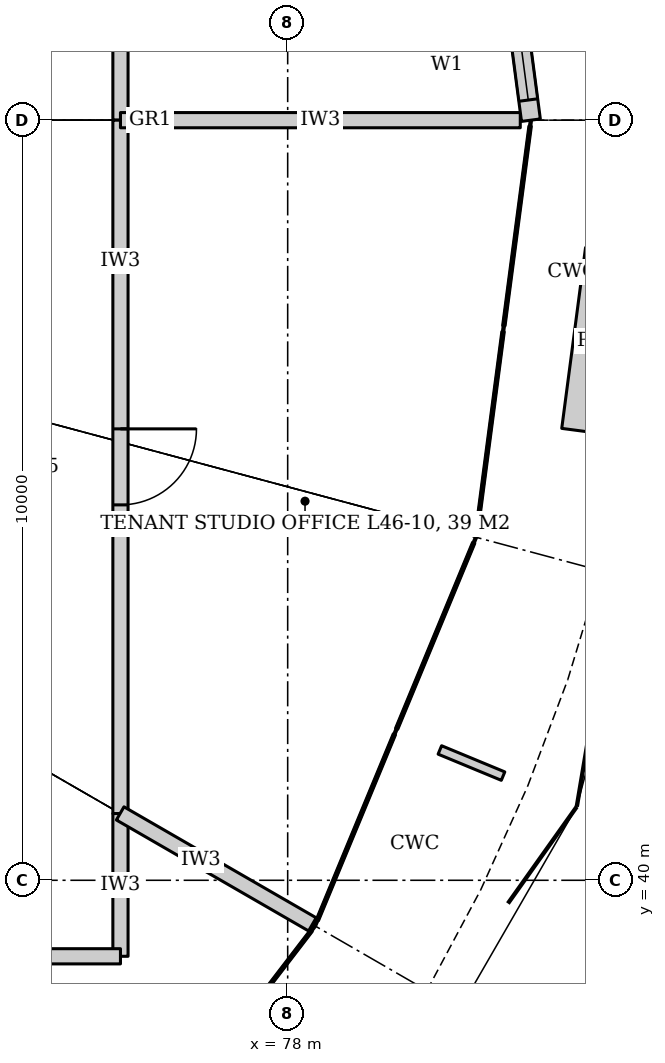
"""IFC4 building model, lengths in metres.
Left out: names, types, materials, properties, quantities, classifications, styles, units other than length and angle.
Written with IfcOpenShell. Run it as: python <this file> out.ifc"""

import sys

from ifc_helpers import new_model, si_unit, direction, frame, frame_2d, origin, place, context, subcontext, project, spatial, rectangle, extrude, element, fill, save


model = new_model("IFC4")
c1 = context("Model", 3, precision=1e-05, world=origin(), true_north=direction((0.0, 1.0)))
c2 = subcontext(c1, "Body", "Model", "MODEL_VIEW")
j1 = project(units=[si_unit("LENGTHUNIT", "METRE"), si_unit("PLANEANGLEUNIT", "RADIAN")], contexts=[c1])
p1 = place(None, origin())
s1 = spatial("IfcSite", under=j1, at=p1, CompositionType="ELEMENT")
p2 = place(p1, origin())
s2 = spatial("IfcBuilding", under=s1, at=p2, CompositionType="ELEMENT")
p3 = place(p2, frame((0.0, 0.0, 202.4)))
s3 = spatial("IfcBuildingStorey", under=s2, at=p3, CompositionType="ELEMENT", Elevation=202.4)
p4 = place(p3, frame((75.8, 58.8, 0.0), z_axis=(0.0, 0.0, 1.0), x_axis=(0.0, -1.0, 0.0)))
e1 = element("IfcWall", 1, at=p4, inside=s3, PredefinedType="PARTITIONING", context=c2, shape_type="SweptSolid", body=[
    extrude(rectangle(XDim=8.8, YDim=0.2, at=frame_2d((4.4, 0.0))), origin(), (0.0, 0.0, 1.0), 3.012),
])
p5 = place(p3, frame((75.8, 50.0, 0.0), z_axis=(0.0, 0.0, 1.0), x_axis=(0.0, -1.0, 0.0)))
e2 = element("IfcWall", 2, at=p5, inside=s3, PredefinedType="PARTITIONING", context=c2, shape_type="SweptSolid", body=[
    extrude(rectangle(XDim=9.122, YDim=0.2, at=frame_2d((4.561, 0.0))), origin(), (0.0, 0.0, 1.0), 3.012),
])
p6 = place(p5, frame((4.061, 0.0, 0.0)))
e3 = element("IfcOpeningElement", 3, at=p6, cuts=e2, PredefinedType="OPENING", context=c2, shape_type="SweptSolid", body=[
    extrude(rectangle(XDim=1.0, YDim=2.1, at=frame_2d((0.5, 1.05))), frame((0.0, 0.11, 0.0), z_axis=(0.0, -1.0, 0.0), x_axis=(1.0, 0.0, 0.0)), (0.0, 0.0, 1.0), 0.22),
])
p7 = place(p3, frame((75.8, 40.878, 0.0), z_axis=(0.0, 0.0, 1.0), x_axis=(0.0, -1.0, 0.0)))
e4 = element("IfcWall", 4, at=p7, inside=s3, PredefinedType="PARTITIONING", context=c2, shape_type="SweptSolid", body=[
    extrude(rectangle(XDim=1.878, YDim=0.2, at=frame_2d((0.939, 0.0))), origin(), (0.0, 0.0, 1.0), 3.012),
])
p8 = place(p3, frame((75.8, 39.0, 0.0), z_axis=(0.0, 0.0, 1.0), x_axis=(-1.0, 0.0, 0.0)))
e5 = element("IfcWall", 5, at=p8, inside=s3, PredefinedType="PARTITIONING", context=c2, shape_type="SweptSolid", body=[
    extrude(rectangle(XDim=2.8, YDim=0.2, at=frame_2d((1.4, 0.0))), origin(), (0.0, 0.0, 1.0), 3.04),
])
p9 = place(p3, frame((75.8, 50.0, 0.0), z_axis=(0.0, 0.0, 1.0), x_axis=(1.0, 0.0, 0.0)))
e6 = element("IfcWall", 6, at=p9, inside=s3, PredefinedType="PARTITIONING", context=c2, shape_type="SweptSolid", body=[
    extrude(rectangle(XDim=5.26, YDim=0.2, at=frame_2d((2.63, 0.0))), origin(), (0.0, 0.0, 1.0), 3.012),
])
p10 = place(p3, frame((75.796, 40.88, 0.0), z_axis=(0.0, 0.0, 1.0), x_axis=(0.866032430508, -0.49998782916, 0.0)))
e7 = element("IfcWall", 7, at=p10, inside=s3, PredefinedType="PARTITIONING", context=c2, shape_type="SweptSolid", body=[
    extrude(rectangle(XDim=2.92, YDim=0.2, at=frame_2d((1.46, 0.0))), origin(), (0.0, 0.0, 1.0), 3.012),
])
p11 = place(p3, frame((81.2, 50.0, 0.0), z_axis=(0.0, 0.0, 1.0), x_axis=(-0.130530967061, 0.991444232742, 0.0)))
e8 = element("IfcWall", 8, at=p11, inside=s3, PredefinedType="SOLIDWALL", context=c2, shape_type="SweptSolid", body=[
    extrude(rectangle(XDim=5.534, YDim=0.25, at=frame_2d((2.767, 0.0))), origin(), (0.0, 0.0, 1.0), 4.04),
])
p12 = place(p11, frame((1.867, 0.0, 0.0)))
e9 = element("IfcOpeningElement", 9, at=p12, cuts=e8, PredefinedType="OPENING", context=c2, shape_type="SweptSolid", body=[
    extrude(rectangle(XDim=1.8, YDim=2.4, at=frame_2d((0.9, 1.2))), frame((0.0, 0.135, 0.0), z_axis=(0.0, -1.0, 0.0), x_axis=(1.0, 0.0, 0.0)), (0.0, 0.0, 1.0), 0.27),
])
p13 = place(p11, frame((0.267, 0.0, 0.0)))
e10 = element("IfcOpeningElement", 10, at=p13, cuts=e8, PredefinedType="OPENING", context=c2, shape_type="SweptSolid", body=[
    extrude(rectangle(XDim=1.2, YDim=2.4, at=frame_2d((0.6, 1.2))), frame((0.0, 0.135, 0.0), z_axis=(0.0, -1.0, 0.0), x_axis=(1.0, 0.0, 0.0)), (0.0, 0.0, 1.0), 0.27),
])
p14 = place(p11, frame((4.067, 0.0, 0.0)))
e11 = element("IfcOpeningElement", 11, at=p14, cuts=e8, PredefinedType="OPENING", context=c2, shape_type="SweptSolid", body=[
    extrude(rectangle(XDim=1.2, YDim=2.4, at=frame_2d((0.6, 1.2))), frame((0.0, 0.135, 0.0), z_axis=(0.0, -1.0, 0.0), x_axis=(1.0, 0.0, 0.0)), (0.0, 0.0, 1.0), 0.27),
])
p15 = place(p6, origin())
e12 = element("IfcDoor", 12, at=p15, inside=s3, OperationType="SINGLE_SWING_LEFT", PredefinedType="DOOR", context=c2, shape_type="SweptSolid", body=[
    extrude(rectangle(XDim=1.0, YDim=2.1, at=frame_2d((0.5, 1.05))), frame((0.0, 0.025, 0.0), z_axis=(0.0, -1.0, 0.0), x_axis=(1.0, 0.0, 0.0)), (0.0, 0.0, 1.0), 0.05),
])
fill(e3, e12)
p16 = place(p13, origin())
e13 = element("IfcWindow", 13, at=p16, inside=s3, PartitioningType="SINGLE_PANEL", PredefinedType="WINDOW", context=c2, shape_type="SweptSolid", body=[
    extrude(rectangle(XDim=1.2, YDim=2.4, at=frame_2d((0.6, 1.2))), frame((0.0, 0.03, 0.0), z_axis=(0.0, -1.0, 0.0), x_axis=(1.0, 0.0, 0.0)), (0.0, 0.0, 1.0), 0.06),
])
fill(e10, e13)
save(model, sys.argv[1])
